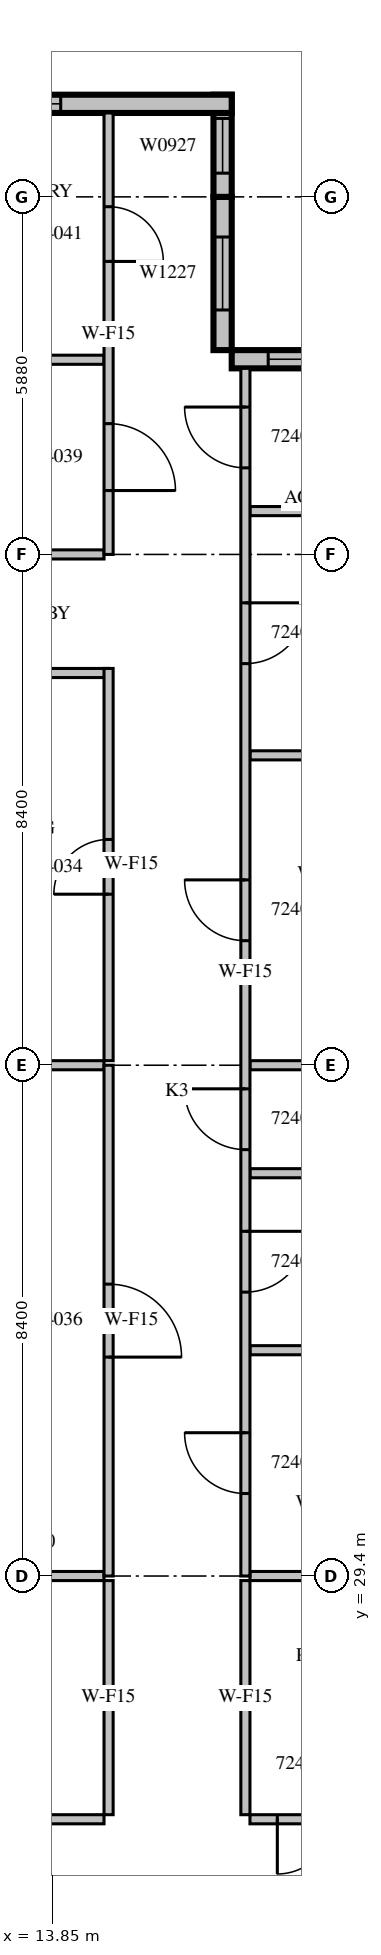
"""IFC4 building model, lengths in metres.
Left out: names, types, materials, properties, quantities, classifications, styles, units other than length and angle.
Written with IfcOpenShell. Run it as: python <this file> out.ifc"""

import sys

from ifc_helpers import new_model, si_unit, direction, frame, frame_2d, origin, place, context, subcontext, project, spatial, rectangle, extrude, source, transform, mapped, element, fill, save


model = new_model("IFC4")
c1 = context("Model", 3, precision=1e-05, world=origin(), true_north=direction((0.0, 1.0)))
c2 = subcontext(c1, "Body", "Model", "MODEL_VIEW")
j1 = project(units=[si_unit("LENGTHUNIT", "METRE"), si_unit("PLANEANGLEUNIT", "RADIAN")], contexts=[c1])
p1 = place(None, origin())
s1 = spatial("IfcSite", under=j1, at=p1, CompositionType="ELEMENT")
p2 = place(p1, origin())
s2 = spatial("IfcBuilding", under=s1, at=p2, CompositionType="ELEMENT")
p3 = place(p2, frame((0.0, 0.0, 111.9)))
s3 = spatial("IfcBuildingStorey", under=s2, at=p3, CompositionType="ELEMENT", Elevation=111.9)
m1 = source(origin(), c2, "Body", "SweptSolid", [
    extrude(rectangle(XDim=4.2, YDim=0.3, at=frame_2d((2.1, 0.0))), origin(), (0.0, 0.0, 1.0), 3.8),
])
p4 = place(p3, frame((21.0, 49.41, 0.0), z_axis=(0.0, 0.0, 1.0), x_axis=(-1.0, 0.0, 0.0)))
e1 = element("IfcWall", 1, at=p4, inside=s3, PredefinedType="STANDARD", context=c2, shape_type="MappedRepresentation", body=[
    mapped(m1, transform((0.0, 0.0, 0.0), scale=1.0)),
])
m2 = source(origin(), c2, "Body", "SweptSolid", [
    extrude(rectangle(XDim=3.0, YDim=2.7, at=frame_2d((1.5, 1.35))), frame((0.0, 0.16, 0.0), z_axis=(0.0, -1.0, 0.0), x_axis=(1.0, 0.0, 0.0)), (0.0, 0.0, 1.0), 0.32),
])
p5 = place(p4, frame((0.6, 0.0, 0.6)))
e2 = element("IfcOpeningElement", 2, at=p5, cuts=e1, PredefinedType="OPENING", context=c2, shape_type="MappedRepresentation", body=[
    mapped(m2, transform((0.0, 0.0, 0.0), scale=1.0)),
])
m3 = source(origin(), c2, "Body", "SweptSolid", [
    extrude(rectangle(XDim=2.52, YDim=0.3, at=frame_2d((1.26, 0.0))), origin(), (0.0, 0.0, 1.0), 3.8),
])
p6 = place(p3, frame((16.65, 49.56, 0.0), z_axis=(0.0, 0.0, 1.0), x_axis=(0.0, 1.0, 0.0)))
e3 = element("IfcWall", 3, at=p6, inside=s3, PredefinedType="STANDARD", context=c2, shape_type="MappedRepresentation", body=[
    mapped(m3, transform((0.0, 0.0, 0.0), scale=1.0)),
])
m4 = source(origin(), c2, "Body", "SweptSolid", [
    extrude(rectangle(XDim=1.2, YDim=2.7, at=frame_2d((0.6, 1.35))), frame((0.0, 0.16, 0.0), z_axis=(0.0, -1.0, 0.0), x_axis=(1.0, 0.0, 0.0)), (0.0, 0.0, 1.0), 0.32),
])
p7 = place(p6, frame((0.66, 0.0, 0.6)))
e4 = element("IfcOpeningElement", 4, at=p7, cuts=e3, PredefinedType="OPENING", context=c2, shape_type="MappedRepresentation", body=[
    mapped(m4, transform((0.0, 0.0, 0.0), scale=1.0)),
])
m5 = source(origin(), c2, "Body", "SweptSolid", [
    extrude(rectangle(XDim=1.68, YDim=0.3, at=frame_2d((0.84, 0.0))), origin(), (0.0, 0.0, 1.0), 3.8),
])
p8 = place(p3, frame((16.65, 52.08, 0.0), z_axis=(0.0, 0.0, 1.0), x_axis=(0.0, 1.0, 0.0)))
e5 = element("IfcWall", 5, at=p8, inside=s3, PredefinedType="STANDARD", context=c2, shape_type="MappedRepresentation", body=[
    mapped(m5, transform((0.0, 0.0, 0.0), scale=1.0)),
])
m6 = source(origin(), c2, "Body", "SweptSolid", [
    extrude(rectangle(XDim=0.9, YDim=2.7, at=frame_2d((0.45, 1.35))), frame((0.0, 0.16, 0.0), z_axis=(0.0, -1.0, 0.0), x_axis=(1.0, 0.0, 0.0)), (0.0, 0.0, 1.0), 0.32),
])
p9 = place(p8, frame((0.39, 0.0, 0.6)))
e6 = element("IfcOpeningElement", 6, at=p9, cuts=e5, PredefinedType="OPENING", context=c2, shape_type="MappedRepresentation", body=[
    mapped(m6, transform((0.0, 0.0, 0.0), scale=1.0)),
])
m7 = source(origin(), c2, "Body", "SweptSolid", [
    extrude(rectangle(XDim=10.5, YDim=0.3, at=frame_2d((5.25, 0.0))), origin(), (0.0, 0.0, 1.0), 3.8),
])
p10 = place(p3, frame((16.8, 53.61, 0.0), z_axis=(0.0, 0.0, 1.0), x_axis=(-1.0, 0.0, 0.0)))
e7 = element("IfcWall", 7, at=p10, inside=s3, PredefinedType="STANDARD", context=c2, shape_type="MappedRepresentation", body=[
    mapped(m7, transform((0.0, 0.0, 0.0), scale=1.0)),
])
m8 = source(origin(), c2, "Body", "SweptSolid", [
    extrude(rectangle(XDim=1.8, YDim=2.7, at=frame_2d((0.9, 1.35))), frame((0.0, 0.16, 0.0), z_axis=(0.0, -1.0, 0.0), x_axis=(1.0, 0.0, 0.0)), (0.0, 0.0, 1.0), 0.32),
])
p11 = place(p10, frame((8.025, 0.0, 0.6)))
e8 = element("IfcOpeningElement", 8, at=p11, cuts=e7, PredefinedType="OPENING", context=c2, shape_type="MappedRepresentation", body=[
    mapped(m8, transform((0.0, 0.0, 0.0), scale=1.0)),
])
m9 = source(origin(), c2, "Body", "SweptSolid", [
    extrude(rectangle(XDim=2.4, YDim=2.7, at=frame_2d((1.2, 1.35))), frame((0.0, 0.16, 0.0), z_axis=(0.0, -1.0, 0.0), x_axis=(1.0, 0.0, 0.0)), (0.0, 0.0, 1.0), 0.32),
])
p12 = place(p10, frame((2.812, 0.0, 0.6)))
e9 = element("IfcOpeningElement", 9, at=p12, cuts=e7, PredefinedType="OPENING", context=c2, shape_type="MappedRepresentation", body=[
    mapped(m9, transform((0.0, 0.0, 0.0), scale=1.0)),
])
m10 = source(origin(), c2, "Body", "SweptSolid", [
    extrude(rectangle(XDim=8.195, YDim=0.15, at=frame_2d((4.098, 0.0))), origin(), (0.0, 0.0, 1.0), 3.8),
])
p13 = place(p3, frame((6.505, 25.4, 0.0), z_axis=(0.0, 0.0, 1.0), x_axis=(1.0, 0.0, 0.0)))
e10 = element("IfcWall", 10, at=p13, inside=s3, PredefinedType="PARTITIONING", context=c2, shape_type="MappedRepresentation", body=[
    mapped(m10, transform((0.0, 0.0, 0.0), scale=1.0)),
])
m11 = source(origin(), c2, "Body", "SweptSolid", [
    extrude(rectangle(XDim=0.9, YDim=2.1, at=frame_2d((0.45, 1.05))), frame((0.0, 0.085, 0.0), z_axis=(0.0, -1.0, 0.0), x_axis=(1.0, 0.0, 0.0)), (0.0, 0.0, 1.0), 0.17),
])
p14 = place(p13, frame((1.045, 0.0, 0.0)))
e11 = element("IfcOpeningElement", 11, at=p14, cuts=e10, PredefinedType="OPENING", context=c2, shape_type="MappedRepresentation", body=[
    mapped(m11, transform((0.0, 0.0, 0.0), scale=1.0)),
])
p15 = place(p13, frame((5.97, 0.0, 0.0)))
e12 = element("IfcOpeningElement", 12, at=p15, cuts=e10, PredefinedType="OPENING", context=c2, shape_type="MappedRepresentation", body=[
    mapped(m11, transform((0.0, 0.0, 0.0), scale=1.0)),
])
m12 = source(origin(), c2, "Body", "SweptSolid", [
    extrude(rectangle(XDim=3.6, YDim=0.15, at=frame_2d((1.8, 0.0))), origin(), (0.0, 0.0, 1.0), 3.8),
])
p16 = place(p3, frame((17.1, 25.4, 0.0), z_axis=(0.0, 0.0, 1.0), x_axis=(1.0, 0.0, 0.0)))
e13 = element("IfcWall", 13, at=p16, inside=s3, PredefinedType="PARTITIONING", context=c2, shape_type="MappedRepresentation", body=[
    mapped(m12, transform((0.0, 0.0, 0.0), scale=1.0)),
])
p17 = place(p16, frame((0.45, 0.0, 0.0)))
e14 = element("IfcOpeningElement", 14, at=p17, cuts=e13, PredefinedType="OPENING", context=c2, shape_type="MappedRepresentation", body=[
    mapped(m11, transform((0.0, 0.0, 0.0), scale=1.0)),
])
m13 = source(origin(), c2, "Body", "SweptSolid", [
    extrude(rectangle(XDim=3.85, YDim=0.15, at=frame_2d((1.925, 0.0))), origin(), (0.0, 0.0, 1.0), 3.8),
])
for number, where, z_axis, x_axis in (
    (15, (14.775, 25.475, 0.0), (0.0, 0.0, 1.0), (0.0, 1.0, 0.0)),
    (16, (17.025, 29.325, 0.0), (0.0, 0.0, 1.0), (0.0, -1.0, 0.0)),
):
    element("IfcWall", number, at=place(p3, frame(where, z_axis=z_axis, x_axis=x_axis)), inside=s3, PredefinedType="PARTITIONING", context=c2, shape_type="MappedRepresentation", body=[
        mapped(m13, transform((0.0, 0.0, 0.0), scale=1.0)),
    ])
m14 = source(origin(), c2, "Body", "SweptSolid", [
    extrude(rectangle(XDim=3.676, YDim=0.15, at=frame_2d((1.838, 0.0))), origin(), (0.0, 0.0, 1.0), 3.8),
])
p18 = place(p3, frame((14.7, 29.4, 0.0), z_axis=(0.0, 0.0, 1.0), x_axis=(-1.0, 0.0, 0.0)))
e17 = element("IfcWall", 17, at=p18, inside=s3, PredefinedType="PARTITIONING", context=c2, shape_type="MappedRepresentation", body=[
    mapped(m14, transform((0.0, 0.0, 0.0), scale=1.0)),
])
m15 = source(origin(), c2, "Body", "SweptSolid", [
    extrude(rectangle(XDim=2.851, YDim=0.15, at=frame_2d((1.425, 0.0))), origin(), (0.0, 0.0, 1.0), 3.8),
])
p19 = place(p3, frame((19.951, 29.4, 0.0), z_axis=(0.0, 0.0, 1.0), x_axis=(-1.0, 0.0, 0.0)))
e18 = element("IfcWall", 18, at=p19, inside=s3, PredefinedType="PARTITIONING", context=c2, shape_type="MappedRepresentation", body=[
    mapped(m15, transform((0.0, 0.0, 0.0), scale=1.0)),
])
m16 = source(origin(), c2, "Body", "SweptSolid", [
    extrude(rectangle(XDim=3.275, YDim=0.15, at=frame_2d((1.637, 0.0))), origin(), (0.0, 0.0, 1.0), 3.8),
])
p20 = place(p3, frame((14.775, 44.25, 0.0), z_axis=(0.0, 0.0, 1.0), x_axis=(-1.0, 0.0, 0.0)))
e19 = element("IfcWall", 19, at=p20, inside=s3, PredefinedType="PARTITIONING", context=c2, shape_type="MappedRepresentation", body=[
    mapped(m16, transform((0.0, 0.0, 0.0), scale=1.0)),
])
m17 = source(origin(), c2, "Body", "SweptSolid", [
    extrude(rectangle(XDim=6.45, YDim=0.15, at=frame_2d((3.225, 0.0))), origin(), (0.0, 0.0, 1.0), 3.8),
])
p21 = place(p3, frame((14.775, 37.875, 0.0), z_axis=(0.0, 0.0, 1.0), x_axis=(0.0, 1.0, 0.0)))
e20 = element("IfcWall", 20, at=p21, inside=s3, PredefinedType="PARTITIONING", context=c2, shape_type="MappedRepresentation", body=[
    mapped(m17, transform((0.0, 0.0, 0.0), scale=1.0)),
])
p22 = place(p21, frame((2.737, 0.0, 0.0)))
e21 = element("IfcOpeningElement", 21, at=p22, cuts=e20, PredefinedType="OPENING", context=c2, shape_type="MappedRepresentation", body=[
    mapped(m11, transform((0.0, 0.0, 0.0), scale=1.0)),
])
m18 = source(origin(), c2, "Body", "SweptSolid", [
    extrude(rectangle(XDim=3.525, YDim=0.15, at=frame_2d((1.762, 0.0))), origin(), (0.0, 0.0, 1.0), 3.8),
])
for number, where, z_axis, x_axis in (
    (22, (14.7, 37.8, 0.0), (0.0, 0.0, 1.0), (-1.0, 0.0, 0.0)),
    (23, (14.7, 49.401, 0.0), (0.0, 0.0, 1.0), (-1.0, 0.0, 0.0)),
    (24, (14.7, 46.2, 0.0), (0.0, 0.0, 1.0), (-1.0, 0.0, 0.0)),
):
    element("IfcWall", number, at=place(p3, frame(where, z_axis=z_axis, x_axis=x_axis)), inside=s3, PredefinedType="PARTITIONING", context=c2, shape_type="MappedRepresentation", body=[
        mapped(m18, transform((0.0, 0.0, 0.0), scale=1.0)),
    ])
for number, where, z_axis, x_axis in (
    (25, (17.1, 33.113, 0.0), (0.0, 0.0, 1.0), (1.0, 0.0, 0.0)),
    (26, (17.1, 36.024, 0.0), (0.0, 0.0, 1.0), (1.0, 0.0, 0.0)),
    (27, (17.1, 42.896, 0.0), (0.0, 0.0, 1.0), (1.0, 0.0, 0.0)),
    (28, (17.1, 46.913, 0.0), (0.0, 0.0, 1.0), (1.0, 0.0, 0.0)),
):
    element("IfcWall", number, at=place(p3, frame(where, z_axis=z_axis, x_axis=x_axis)), inside=s3, PredefinedType="PARTITIONING", context=c2, shape_type="MappedRepresentation", body=[
        mapped(m12, transform((0.0, 0.0, 0.0), scale=1.0)),
    ])
p23 = place(p3, frame((19.951, 37.8, 0.0), z_axis=(0.0, 0.0, 1.0), x_axis=(-1.0, 0.0, 0.0)))
e29 = element("IfcWall", 29, at=p23, inside=s3, PredefinedType="PARTITIONING", context=c2, shape_type="MappedRepresentation", body=[
    mapped(m15, transform((0.0, 0.0, 0.0), scale=1.0)),
])
m19 = source(origin(), c2, "Body", "SweptSolid", [
    extrude(rectangle(XDim=8.4, YDim=0.15, at=frame_2d((4.2, 0.0))), origin(), (0.0, 0.0, 1.0), 3.8),
])
p24 = place(p3, frame((14.775, 29.4, 0.0), z_axis=(0.0, 0.0, 1.0), x_axis=(0.0, 1.0, 0.0)))
e30 = element("IfcWall", 30, at=p24, inside=s3, PredefinedType="PARTITIONING", context=c2, shape_type="MappedRepresentation", body=[
    mapped(m19, transform((0.0, 0.0, 0.0), scale=1.0)),
])
m20 = source(origin(), c2, "Body", "SweptSolid", [
    extrude(rectangle(XDim=1.2, YDim=2.1, at=frame_2d((0.6, 1.05))), frame((0.0, 0.085, 0.0), z_axis=(0.0, -1.0, 0.0), x_axis=(1.0, 0.0, 0.0)), (0.0, 0.0, 1.0), 0.17),
])
p25 = place(p24, frame((3.6, 0.0, 0.0)))
e31 = element("IfcOpeningElement", 31, at=p25, cuts=e30, PredefinedType="OPENING", context=c2, shape_type="MappedRepresentation", body=[
    mapped(m20, transform((0.0, 0.0, 0.0), scale=1.0)),
])
m21 = source(origin(), c2, "Body", "SweptSolid", [
    extrude(rectangle(XDim=7.26, YDim=0.15, at=frame_2d((3.63, 0.0))), origin(), (0.0, 0.0, 1.0), 3.8),
])
p26 = place(p3, frame((14.775, 46.2, 0.0), z_axis=(0.0, 0.0, 1.0), x_axis=(0.0, 1.0, 0.0)))
e32 = element("IfcWall", 32, at=p26, inside=s3, PredefinedType="PARTITIONING", context=c2, shape_type="MappedRepresentation", body=[
    mapped(m21, transform((0.0, 0.0, 0.0), scale=1.0)),
])
m22 = source(origin(), c2, "Body", "SweptSolid", [
    extrude(rectangle(XDim=1.1, YDim=2.1, at=frame_2d((0.55, 1.05))), frame((0.0, 0.085, 0.0), z_axis=(0.0, -1.0, 0.0), x_axis=(1.0, 0.0, 0.0)), (0.0, 0.0, 1.0), 0.17),
])
p27 = place(p26, frame((1.051, 0.0, 0.0)))
e33 = element("IfcOpeningElement", 33, at=p27, cuts=e32, PredefinedType="OPENING", context=c2, shape_type="MappedRepresentation", body=[
    mapped(m22, transform((0.0, 0.0, 0.0), scale=1.0)),
])
p28 = place(p26, frame((4.818, 0.0, 0.0)))
e34 = element("IfcOpeningElement", 34, at=p28, cuts=e32, PredefinedType="OPENING", context=c2, shape_type="MappedRepresentation", body=[
    mapped(m11, transform((0.0, 0.0, 0.0), scale=1.0)),
])
m23 = source(origin(), c2, "Body", "SweptSolid", [
    extrude(rectangle(XDim=19.86, YDim=0.15, at=frame_2d((9.93, 0.0))), origin(), (0.0, 0.0, 1.0), 3.8),
])
p29 = place(p3, frame((17.025, 49.26, 0.0), z_axis=(0.0, 0.0, 1.0), x_axis=(0.0, -1.0, 0.0)))
e35 = element("IfcWall", 35, at=p29, inside=s3, PredefinedType="PARTITIONING", context=c2, shape_type="MappedRepresentation", body=[
    mapped(m23, transform((0.0, 0.0, 0.0), scale=1.0)),
])
m24 = source(origin(), c2, "Body", "SweptSolid", [
    extrude(rectangle(XDim=1.0, YDim=2.1, at=frame_2d((0.5, 1.05))), frame((0.0, 0.085, 0.0), z_axis=(0.0, -1.0, 0.0), x_axis=(1.0, 0.0, 0.0)), (0.0, 0.0, 1.0), 0.17),
])
p30 = place(p29, frame((17.503, 0.0, 0.0)))
e36 = element("IfcOpeningElement", 36, at=p30, cuts=e35, PredefinedType="OPENING", context=c2, shape_type="MappedRepresentation", body=[
    mapped(m24, transform((0.0, 0.0, 0.0), scale=1.0)),
])
p31 = place(p29, frame((14.191, 0.0, 0.0)))
e37 = element("IfcOpeningElement", 37, at=p31, cuts=e35, PredefinedType="OPENING", context=c2, shape_type="MappedRepresentation", body=[
    mapped(m24, transform((0.0, 0.0, 0.0), scale=1.0)),
])
p32 = place(p29, frame((11.848, 0.0, 0.0)))
e38 = element("IfcOpeningElement", 38, at=p32, cuts=e35, PredefinedType="OPENING", context=c2, shape_type="MappedRepresentation", body=[
    mapped(m24, transform((0.0, 0.0, 0.0), scale=1.0)),
])
p33 = place(p29, frame((8.412, 0.0, 0.0)))
e39 = element("IfcOpeningElement", 39, at=p33, cuts=e35, PredefinedType="OPENING", context=c2, shape_type="MappedRepresentation", body=[
    mapped(m24, transform((0.0, 0.0, 0.0), scale=1.0)),
])
p34 = place(p29, frame((3.856, 0.0, 0.0)))
e40 = element("IfcOpeningElement", 40, at=p34, cuts=e35, PredefinedType="OPENING", context=c2, shape_type="MappedRepresentation", body=[
    mapped(m24, transform((0.0, 0.0, 0.0), scale=1.0)),
])
p35 = place(p29, frame((0.636, 0.0, 0.0)))
e41 = element("IfcOpeningElement", 41, at=p35, cuts=e35, PredefinedType="OPENING", context=c2, shape_type="MappedRepresentation", body=[
    mapped(m24, transform((0.0, 0.0, 0.0), scale=1.0)),
])
m25 = source(origin(), c2, "Body", "SweptSolid", [
    extrude(rectangle(XDim=3.0, YDim=2.7, at=frame_2d((1.5, 1.35))), frame((0.0, 0.03, 0.0), z_axis=(0.0, -1.0, 0.0), x_axis=(1.0, 0.0, 0.0)), (0.0, 0.0, 1.0), 0.06),
])
p36 = place(p5, origin())
e42 = element("IfcWindow", 42, at=p36, inside=s3, PartitioningType="SINGLE_PANEL", PredefinedType="WINDOW", context=c2, shape_type="MappedRepresentation", body=[
    mapped(m25, transform((0.0, 0.0, 0.0), scale=1.0)),
])
fill(e2, e42)
m26 = source(origin(), c2, "Body", "SweptSolid", [
    extrude(rectangle(XDim=1.2, YDim=2.7, at=frame_2d((0.6, 1.35))), frame((0.0, 0.03, 0.0), z_axis=(0.0, -1.0, 0.0), x_axis=(1.0, 0.0, 0.0)), (0.0, 0.0, 1.0), 0.06),
])
p37 = place(p7, origin())
e43 = element("IfcWindow", 43, at=p37, inside=s3, PartitioningType="SINGLE_PANEL", PredefinedType="WINDOW", context=c2, shape_type="MappedRepresentation", body=[
    mapped(m26, transform((0.0, 0.0, 0.0), scale=1.0)),
])
fill(e4, e43)
m27 = source(origin(), c2, "Body", "SweptSolid", [
    extrude(rectangle(XDim=0.9, YDim=2.7, at=frame_2d((0.45, 1.35))), frame((0.0, 0.03, 0.0), z_axis=(0.0, -1.0, 0.0), x_axis=(1.0, 0.0, 0.0)), (0.0, 0.0, 1.0), 0.06),
])
p38 = place(p9, origin())
e44 = element("IfcWindow", 44, at=p38, inside=s3, PartitioningType="SINGLE_PANEL", PredefinedType="WINDOW", context=c2, shape_type="MappedRepresentation", body=[
    mapped(m27, transform((0.0, 0.0, 0.0), scale=1.0)),
])
fill(e6, e44)
m28 = source(origin(), c2, "Body", "SweptSolid", [
    extrude(rectangle(XDim=2.4, YDim=2.7, at=frame_2d((1.2, 1.35))), frame((0.0, 0.03, 0.0), z_axis=(0.0, -1.0, 0.0), x_axis=(1.0, 0.0, 0.0)), (0.0, 0.0, 1.0), 0.06),
])
p39 = place(p12, origin())
e45 = element("IfcWindow", 45, at=p39, inside=s3, PartitioningType="SINGLE_PANEL", PredefinedType="WINDOW", context=c2, shape_type="MappedRepresentation", body=[
    mapped(m28, transform((0.0, 0.0, 0.0), scale=1.0)),
])
fill(e9, e45)
m29 = source(origin(), c2, "Body", "SweptSolid", [
    extrude(rectangle(XDim=0.9, YDim=2.1, at=frame_2d((0.45, 1.05))), frame((0.0, 0.025, 0.0), z_axis=(0.0, -1.0, 0.0), x_axis=(1.0, 0.0, 0.0)), (0.0, 0.0, 1.0), 0.05),
])
p40 = place(p17, origin())
e46 = element("IfcDoor", 46, at=p40, inside=s3, OperationType="SINGLE_SWING_RIGHT", PredefinedType="DOOR", context=c2, shape_type="MappedRepresentation", body=[
    mapped(m29, transform((0.0, 0.0, 0.0), scale=1.0)),
])
fill(e14, e46)
p41 = place(p22, origin())
e47 = element("IfcDoor", 47, at=p41, inside=s3, OperationType="SINGLE_SWING_LEFT", PredefinedType="DOOR", context=c2, shape_type="MappedRepresentation", body=[
    mapped(m29, transform((0.0, 0.0, 0.0), scale=1.0)),
])
fill(e21, e47)
m30 = source(origin(), c2, "Body", "SweptSolid", [
    extrude(rectangle(XDim=1.2, YDim=2.1, at=frame_2d((0.6, 1.05))), frame((0.0, 0.025, 0.0), z_axis=(0.0, -1.0, 0.0), x_axis=(1.0, 0.0, 0.0)), (0.0, 0.0, 1.0), 0.05),
])
p42 = place(p25, origin())
e48 = element("IfcDoor", 48, at=p42, inside=s3, OperationType="SINGLE_SWING_RIGHT", PredefinedType="DOOR", context=c2, shape_type="MappedRepresentation", body=[
    mapped(m30, transform((0.0, 0.0, 0.0), scale=1.0)),
])
fill(e31, e48)
m31 = source(origin(), c2, "Body", "SweptSolid", [
    extrude(rectangle(XDim=1.1, YDim=2.1, at=frame_2d((0.55, 1.05))), frame((0.0, 0.025, 0.0), z_axis=(0.0, -1.0, 0.0), x_axis=(1.0, 0.0, 0.0)), (0.0, 0.0, 1.0), 0.05),
])
p43 = place(p27, origin())
e49 = element("IfcDoor", 49, at=p43, inside=s3, OperationType="SINGLE_SWING_RIGHT", PredefinedType="DOOR", context=c2, shape_type="MappedRepresentation", body=[
    mapped(m31, transform((0.0, 0.0, 0.0), scale=1.0)),
])
fill(e33, e49)
p44 = place(p28, origin())
e50 = element("IfcDoor", 50, at=p44, inside=s3, OperationType="SINGLE_SWING_RIGHT", PredefinedType="DOOR", context=c2, shape_type="MappedRepresentation", body=[
    mapped(m29, transform((0.0, 0.0, 0.0), scale=1.0)),
])
fill(e34, e50)
m32 = source(origin(), c2, "Body", "SweptSolid", [
    extrude(rectangle(XDim=1.0, YDim=2.1, at=frame_2d((0.5, 1.05))), frame((0.0, 0.025, 0.0), z_axis=(0.0, -1.0, 0.0), x_axis=(1.0, 0.0, 0.0)), (0.0, 0.0, 1.0), 0.05),
])
p45 = place(p30, origin())
e51 = element("IfcDoor", 51, at=p45, inside=s3, OperationType="SINGLE_SWING_RIGHT", PredefinedType="DOOR", context=c2, shape_type="MappedRepresentation", body=[
    mapped(m32, transform((0.0, 0.0, 0.0), scale=1.0)),
])
fill(e36, e51)
p46 = place(p31, origin())
e52 = element("IfcDoor", 52, at=p46, inside=s3, OperationType="SINGLE_SWING_LEFT", PredefinedType="DOOR", context=c2, shape_type="MappedRepresentation", body=[
    mapped(m32, transform((0.0, 0.0, 0.0), scale=1.0)),
])
fill(e37, e52)
p47 = place(p32, origin())
e53 = element("IfcDoor", 53, at=p47, inside=s3, OperationType="SINGLE_SWING_RIGHT", PredefinedType="DOOR", context=c2, shape_type="MappedRepresentation", body=[
    mapped(m32, transform((0.0, 0.0, 0.0), scale=1.0)),
])
fill(e38, e53)
p48 = place(p33, origin())
e54 = element("IfcDoor", 54, at=p48, inside=s3, OperationType="SINGLE_SWING_RIGHT", PredefinedType="DOOR", context=c2, shape_type="MappedRepresentation", body=[
    mapped(m32, transform((0.0, 0.0, 0.0), scale=1.0)),
])
fill(e39, e54)
p49 = place(p34, origin())
e55 = element("IfcDoor", 55, at=p49, inside=s3, OperationType="SINGLE_SWING_LEFT", PredefinedType="DOOR", context=c2, shape_type="MappedRepresentation", body=[
    mapped(m32, transform((0.0, 0.0, 0.0), scale=1.0)),
])
fill(e40, e55)
p50 = place(p35, origin())
e56 = element("IfcDoor", 56, at=p50, inside=s3, OperationType="SINGLE_SWING_RIGHT", PredefinedType="DOOR", context=c2, shape_type="MappedRepresentation", body=[
    mapped(m32, transform((0.0, 0.0, 0.0), scale=1.0)),
])
fill(e41, e56)
save(model, sys.argv[1])
